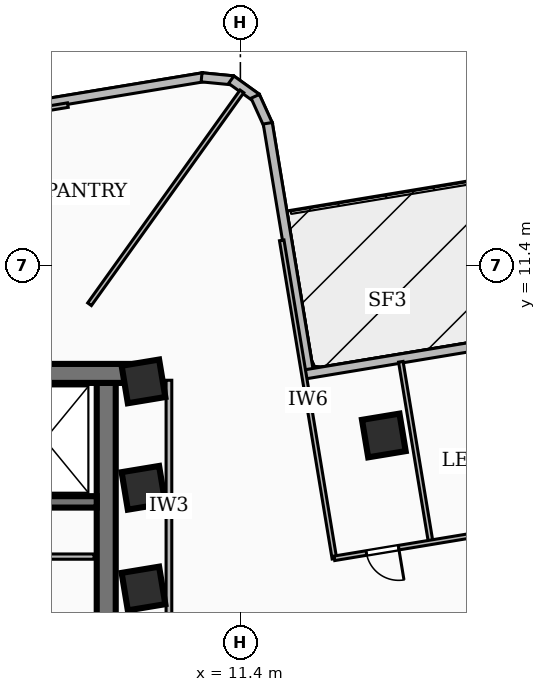
"""IFC4 building model, lengths in metres.
Left out: names, types, materials, properties, quantities, classifications, styles, units other than length and angle.
Written with IfcOpenShell. Run it as: python <this file> out.ifc"""

import sys

from ifc_helpers import new_model, si_unit, direction, frame, frame_2d, origin, origin_2d, place, context, subcontext, project, spatial, rectangle, extrude, element, fill, save


model = new_model("IFC4")
c1 = context("Model", 3, precision=1e-05, world=origin(), true_north=direction((0.0, 1.0)))
c2 = subcontext(c1, "Body", "Model", "MODEL_VIEW")
j1 = project(units=[si_unit("LENGTHUNIT", "METRE"), si_unit("PLANEANGLEUNIT", "RADIAN")], contexts=[c1])
p1 = place(None, origin())
s1 = spatial("IfcSite", under=j1, at=p1, CompositionType="ELEMENT")
p2 = place(p1, origin())
s2 = spatial("IfcBuilding", under=s1, at=p2, CompositionType="ELEMENT")
p3 = place(p2, frame((0.0, 0.0, 92.88)))
s3 = spatial("IfcBuildingStorey", under=s2, at=p3, CompositionType="ELEMENT", Elevation=92.88)
p4 = place(p3, frame((-8.78, 8.56, 0.0), z_axis=(0.0, 0.0, 1.0), x_axis=(1.0, 0.0, 0.0)))
e1 = element("IfcWall", 1, at=p4, inside=s3, PredefinedType="SHEAR", context=c2, shape_type="SweptSolid", body=[
    extrude(rectangle(XDim=17.56, YDim=0.5, at=frame_2d((8.78, 0.0))), origin(), (0.0, 0.0, 1.0), 3.34),
])
p5 = place(p3, frame((7.87, 8.31, 0.0), z_axis=(0.0, 0.0, 1.0), x_axis=(0.0, -1.0, 0.0)))
e2 = element("IfcWall", 2, at=p5, inside=s3, PredefinedType="SHEAR", context=c2, shape_type="SweptSolid", body=[
    extrude(rectangle(XDim=6.31, YDim=0.5, at=frame_2d((3.155, 0.0))), origin(), (0.0, 0.0, 1.0), 3.34),
])
p6 = place(p3, frame((7.62, 5.18, 0.0), z_axis=(0.0, 0.0, 1.0), x_axis=(-1.0, 0.0, 0.0)))
e3 = element("IfcWall", 3, at=p6, inside=s3, PredefinedType="SOLIDWALL", context=c2, shape_type="SweptSolid", body=[
    extrude(rectangle(XDim=15.24, YDim=0.3, at=frame_2d((7.62, 0.0))), origin(), (0.0, 0.0, 1.0), 3.34),
])
p7 = place(p6, frame((5.77, 0.0, 0.0)))
e4 = element("IfcOpeningElement", 4, at=p7, cuts=e3, PredefinedType="OPENING", context=c2, shape_type="SweptSolid", body=[
    extrude(rectangle(XDim=1.1, YDim=2.15, at=frame_2d((0.55, 1.075))), frame((0.0, 0.16, 0.0), z_axis=(0.0, -1.0, 0.0), x_axis=(1.0, 0.0, 0.0)), (0.0, 0.0, 1.0), 0.32),
])
p8 = place(p6, frame((2.97, 0.0, 0.0)))
e5 = element("IfcOpeningElement", 5, at=p8, cuts=e3, PredefinedType="OPENING", context=c2, shape_type="SweptSolid", body=[
    extrude(rectangle(XDim=1.1, YDim=2.15, at=frame_2d((0.55, 1.075))), frame((0.0, 0.16, 0.0), z_axis=(0.0, -1.0, 0.0), x_axis=(1.0, 0.0, 0.0)), (0.0, 0.0, 1.0), 0.32),
])
p9 = place(p6, frame((7.97, 0.0, 0.0)))
e6 = element("IfcOpeningElement", 6, at=p9, cuts=e3, PredefinedType="OPENING", context=c2, shape_type="SweptSolid", body=[
    extrude(rectangle(XDim=1.0, YDim=2.1, at=frame_2d((0.5, 1.05))), frame((0.0, 0.16, 0.0), z_axis=(0.0, -1.0, 0.0), x_axis=(1.0, 0.0, 0.0)), (0.0, 0.0, 1.0), 0.32),
])
for number, where, z_axis, x_axis in (
    (7, (8.85, 2.9, 0.0), (0.0, 0.0, 1.0), (0.987, 0.163, 0.0)),
    (8, (8.85, 5.55, 0.0), (0.0, 0.0, 1.0), (0.987, 0.163, 0.0)),
    (9, (8.85, 8.35, 0.0), (0.0, 0.0, 1.0), (0.987, 0.163, 0.0)),
    (10, (15.175, 6.927, 0.0), (0.0, 0.0, 1.0), (0.987, 0.163, 0.0)),
):
    element("IfcColumn", number, at=place(p3, frame(where, z_axis=z_axis, x_axis=x_axis)), inside=s3, PredefinedType="COLUMN", context=c2, shape_type="SweptSolid", body=[
        extrude(rectangle(XDim=1.0, YDim=1.0, at=origin_2d()), origin(), (0.0, 0.0, 1.0), 3.6),
    ])
p10 = place(p3, frame((4.276, 15.335, 0.0), z_axis=(0.0, 0.0, 1.0), x_axis=(0.986586851863, 0.16323720082, 0.0)))
e11 = element("IfcWall", 11, at=p10, inside=s3, PredefinedType="SOLIDWALL", context=c2, shape_type="SweptSolid", body=[
    extrude(rectangle(XDim=6.237, YDim=0.24, at=frame_2d((3.118, 0.0))), origin(), (0.0, 0.0, 1.0), 2.486),
])
p11 = place(p3, frame((10.379, 16.351, 0.0), z_axis=(0.0, 0.0, 1.0), x_axis=(0.995335447313, -0.096474594184, 0.0)))
e12 = element("IfcWall", 12, at=p11, inside=s3, PredefinedType="SOLIDWALL", context=c2, shape_type="SweptSolid", body=[
    extrude(rectangle(XDim=0.83, YDim=0.24, at=frame_2d((0.415, 0.0))), origin(), (0.0, 0.0, 1.0), 3.34),
])
p12 = place(p3, frame((11.16, 16.288, 0.0), z_axis=(0.0, 0.0, 1.0), x_axis=(0.812068662375, -0.583561896965, 0.0)))
e13 = element("IfcWall", 13, at=p12, inside=s3, PredefinedType="SOLIDWALL", context=c2, shape_type="SweptSolid", body=[
    extrude(rectangle(XDim=0.814, YDim=0.24, at=frame_2d((0.407, 0.0))), origin(), (0.0, 0.0, 1.0), 3.34),
])
p13 = place(p3, frame((11.791, 15.851, 0.0), z_axis=(0.0, 0.0, 1.0), x_axis=(0.412696106872, -0.910868773958, 0.0)))
e14 = element("IfcWall", 14, at=p13, inside=s3, PredefinedType="SOLIDWALL", context=c2, shape_type="SweptSolid", body=[
    extrude(rectangle(XDim=0.831, YDim=0.24, at=frame_2d((0.416, 0.0))), origin(), (0.0, 0.0, 1.0), 3.34),
])
p14 = place(p3, frame((12.12, 15.142, 0.0), z_axis=(0.0, 0.0, 1.0), x_axis=(0.163241835244, -0.986586085056, 0.0)))
e15 = element("IfcWall", 15, at=p14, inside=s3, PredefinedType="SOLIDWALL", context=c2, shape_type="SweptSolid", body=[
    extrude(rectangle(XDim=6.775, YDim=0.24, at=frame_2d((3.387, 0.0))), origin(), (0.0, 0.0, 1.0), 2.644),
])
p15 = place(p3, frame((13.115, 8.537, 0.0), z_axis=(0.0, 0.0, 1.0), x_axis=(0.986576548161, 0.163299463007, 0.0)))
e16 = element("IfcWall", 16, at=p15, inside=s3, PredefinedType="SOLIDWALL", context=c2, shape_type="SweptSolid", body=[
    extrude(rectangle(XDim=16.277, YDim=0.24, at=frame_2d((8.138, 0.0))), origin(), (0.0, 0.0, 1.0), 2.644),
])
p16 = place(p15, frame((4.4, 0.0, 0.0)))
e17 = element("IfcOpeningElement", 17, at=p16, cuts=e16, PredefinedType="OPENING", context=c2, shape_type="SweptSolid", body=[
    extrude(rectangle(XDim=1.1, YDim=2.1, at=frame_2d((0.55, 1.05))), frame((0.0, 0.13, 0.0), z_axis=(0.0, -1.0, 0.0), x_axis=(1.0, 0.0, 0.0)), (0.0, 0.0, 1.0), 0.26),
])
p17 = place(p3, frame((2.9, 3.74, 0.0), z_axis=(0.0, 0.0, 1.0), x_axis=(1.0, 0.0, 0.0)))
e18 = element("IfcWall", 18, at=p17, inside=s3, PredefinedType="PARTITIONING", context=c2, shape_type="SweptSolid", body=[
    extrude(rectangle(XDim=4.65, YDim=0.138, at=frame_2d((2.325, 0.0))), origin(), (0.0, 0.0, 1.0), 3.34),
])
p18 = place(p3, frame((9.52, 1.75, 0.0), z_axis=(0.0, 0.0, 1.0), x_axis=(0.0, 1.0, 0.0)))
e19 = element("IfcWall", 19, at=p18, inside=s3, PredefinedType="PARTITIONING", context=c2, shape_type="SweptSolid", body=[
    extrude(rectangle(XDim=6.63, YDim=0.15, at=frame_2d((3.315, 0.0))), origin(), (0.0, 0.0, 1.0), 2.486),
])
p19 = place(p3, frame((7.431, 10.38, 0.0), z_axis=(0.0, 0.0, 1.0), x_axis=(0.582126278944, 0.813098392178, 0.0)))
e20 = element("IfcWall", 20, at=p19, inside=s3, PredefinedType="PARTITIONING", context=c2, shape_type="SweptSolid", body=[
    extrude(rectangle(XDim=6.889, YDim=0.12, at=frame_2d((3.444, 0.0))), origin(), (0.0, 0.0, 1.0), 2.486),
])
p20 = place(p3, frame((13.874, 3.686, 0.0), z_axis=(0.0, 0.0, 1.0), x_axis=(-0.163270245909, 0.98658138377, 0.0)))
e21 = element("IfcWall", 21, at=p20, inside=s3, PredefinedType="PARTITIONING", context=c2, shape_type="SweptSolid", body=[
    extrude(rectangle(XDim=8.489, YDim=0.12, at=frame_2d((4.245, 0.0))), origin(), (0.0, 0.0, 1.0), 2.486),
])
p21 = place(p3, frame((16.405, 4.135, 0.0), z_axis=(0.0, 0.0, 1.0), x_axis=(-0.163276056047, 0.986580422227, 0.0)))
e22 = element("IfcWall", 22, at=p21, inside=s3, PredefinedType="PARTITIONING", context=c2, shape_type="SweptSolid", body=[
    extrude(rectangle(XDim=4.795, YDim=0.12, at=frame_2d((2.398, 0.0))), origin(), (0.0, 0.0, 1.0), 2.486),
])
p22 = place(p3, frame((21.114, 4.894, 0.0), z_axis=(0.0, 0.0, 1.0), x_axis=(-0.986566884893, -0.163357833093, 0.0)))
e23 = element("IfcWall", 23, at=p22, inside=s3, PredefinedType="PARTITIONING", context=c2, shape_type="SweptSolid", body=[
    extrude(rectangle(XDim=7.34, YDim=0.12, at=frame_2d((3.67, 0.0))), origin(), (0.0, 0.0, 1.0), 3.34),
])
p23 = place(p22, frame((5.625, 0.0, 0.0)))
e24 = element("IfcOpeningElement", 24, at=p23, cuts=e23, PredefinedType="OPENING", context=c2, shape_type="SweptSolid", body=[
    extrude(rectangle(XDim=0.86, YDim=2.04, at=frame_2d((0.43, 1.02))), frame((0.0, 0.07, 0.0), z_axis=(0.0, -1.0, 0.0), x_axis=(1.0, 0.0, 0.0)), (0.0, 0.0, 1.0), 0.14),
])
p24 = place(p22, frame((1.955, 0.0, 0.0)))
e25 = element("IfcOpeningElement", 25, at=p24, cuts=e23, PredefinedType="OPENING", context=c2, shape_type="SweptSolid", body=[
    extrude(rectangle(XDim=0.86, YDim=2.04, at=frame_2d((0.43, 1.02))), frame((0.0, 0.07, 0.0), z_axis=(0.0, -1.0, 0.0), x_axis=(1.0, 0.0, 0.0)), (0.0, 0.0, 1.0), 0.14),
])
p25 = place(p3, frame((6.86, 15.62, 0.0), z_axis=(0.0, 0.0, 1.0), x_axis=(-0.986575116384, -0.16330811288, 0.0)))
e26 = element("IfcWall", 26, at=p25, inside=s3, PredefinedType="PARTITIONING", context=c2, shape_type="SweptSolid", body=[
    extrude(rectangle(XDim=7.949, YDim=0.12, at=frame_2d((3.974, 0.0))), origin(), (0.0, 0.0, 1.0), 2.486),
])
p26 = place(p23, origin())
e27 = element("IfcDoor", 27, at=p26, inside=s3, OperationType="SINGLE_SWING_LEFT", PredefinedType="DOOR", context=c2, shape_type="SweptSolid", body=[
    extrude(rectangle(XDim=0.86, YDim=2.04, at=frame_2d((0.43, 1.02))), frame((0.0, 0.025, 0.0), z_axis=(0.0, -1.0, 0.0), x_axis=(1.0, 0.0, 0.0)), (0.0, 0.0, 1.0), 0.05),
])
fill(e24, e27)
save(model, sys.argv[1])
